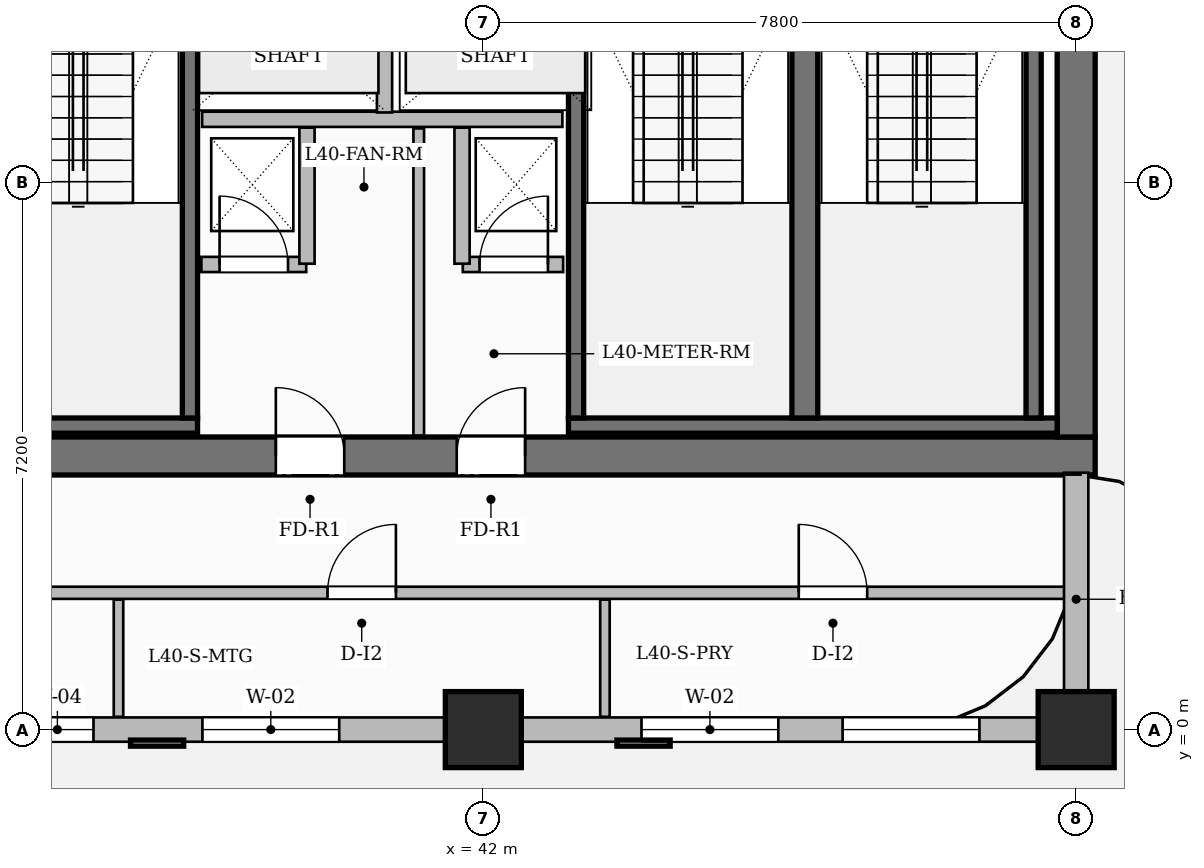
"""IFC4 building model, lengths in metres.
Left out: names, types, materials, properties, quantities, classifications, styles, units other than length and angle.
Written with IfcOpenShell. Run it as: python <this file> out.ifc"""

import sys

from ifc_helpers import new_model, si_unit, direction, frame, frame_2d, origin, origin_2d, place, context, subcontext, project, spatial, rectangle, extrude, source, transform, mapped, element, fill, save


model = new_model("IFC4")
c1 = context("Model", 3, precision=1e-05, world=origin(), true_north=direction((0.0, 1.0)))
c2 = subcontext(c1, "Body", "Model", "MODEL_VIEW")
j1 = project(units=[si_unit("LENGTHUNIT", "METRE"), si_unit("PLANEANGLEUNIT", "RADIAN")], contexts=[c1])
p1 = place(None, origin())
s1 = spatial("IfcSite", under=j1, at=p1, CompositionType="ELEMENT")
p2 = place(p1, origin())
s2 = spatial("IfcBuilding", under=s1, at=p2, CompositionType="ELEMENT")
p3 = place(p2, frame((0.0, 0.0, 161.85)))
s3 = spatial("IfcBuildingStorey", under=s2, at=p3, CompositionType="ELEMENT", Elevation=161.85)
p4 = place(p3, frame((34.55, 3.6, 0.0), z_axis=(0.0, 0.0, 1.0), x_axis=(1.0, 0.0, 0.0)))
e1 = element("IfcWall", 1, at=p4, inside=s3, PredefinedType="SHEAR", context=c2, shape_type="SweptSolid", body=[
    extrude(rectangle(XDim=15.5, YDim=0.5, at=frame_2d((7.75, 0.0))), origin(), (0.0, 0.0, 1.0), 3.85),
])
p5 = place(p4, frame((4.72, 0.0, 0.0)))
e2 = element("IfcOpeningElement", 2, at=p5, cuts=e1, PredefinedType="OPENING", context=c2, shape_type="SweptSolid", body=[
    extrude(rectangle(XDim=0.9, YDim=2.1, at=frame_2d((0.45, 1.05))), frame((0.0, 0.26, 0.0), z_axis=(0.0, -1.0, 0.0), x_axis=(1.0, 0.0, 0.0)), (0.0, 0.0, 1.0), 0.52),
])
p6 = place(p4, frame((7.1, 0.0, 0.0)))
e3 = element("IfcOpeningElement", 3, at=p6, cuts=e1, PredefinedType="OPENING", context=c2, shape_type="SweptSolid", body=[
    extrude(rectangle(XDim=0.9, YDim=2.1, at=frame_2d((0.45, 1.05))), frame((0.0, 0.26, 0.0), z_axis=(0.0, -1.0, 0.0), x_axis=(1.0, 0.0, 0.0)), (0.0, 0.0, 1.0), 0.52),
])
p7 = place(p3, frame((49.8, 3.85, 0.0), z_axis=(0.0, 0.0, 1.0), x_axis=(0.0, 1.0, 0.0)))
e4 = element("IfcWall", 4, at=p7, inside=s3, PredefinedType="SHEAR", context=c2, shape_type="SweptSolid", body=[
    extrude(rectangle(XDim=10.3, YDim=0.5, at=frame_2d((5.15, 0.0))), origin(), (0.0, 0.0, 1.0), 3.85),
])
m1 = source(origin(), c2, "Body", "SweptSolid", [
    extrude(rectangle(XDim=1.0, YDim=1.0, at=origin_2d()), origin(), (0.0, 0.0, 1.0), 3.85),
])
for number, where, z_axis, x_axis in (
    (5, (42.0, 0.0, 0.0), (0.0, 0.0, 1.0), (1.0, 0.0, 0.0)),
    (6, (49.8, 0.0, 0.0), (0.0, 0.0, 1.0), (1.0, 0.0, 0.0)),
):
    element("IfcColumn", number, at=place(p3, frame(where, z_axis=z_axis, x_axis=x_axis)), inside=s3, PredefinedType="COLUMN", context=c2, shape_type="MappedRepresentation", body=[
        mapped(m1, transform((0.0, 0.0, 0.0), scale=1.0)),
    ])
p8 = place(p3, frame((35.05, 4.0, 0.0), z_axis=(0.0, 0.0, 1.0), x_axis=(1.0, 0.0, 0.0)))
e7 = element("IfcWall", 7, at=p8, inside=s3, PredefinedType="SHEAR", context=c2, shape_type="SweptSolid", body=[
    extrude(rectangle(XDim=3.19, YDim=0.2, at=frame_2d((1.595, 0.0))), origin(), (0.0, 0.0, 1.0), 3.85),
])
p9 = place(p3, frame((38.14, 4.1, 0.0), z_axis=(0.0, 0.0, 1.0), x_axis=(0.0, 1.0, 0.0)))
e8 = element("IfcWall", 8, at=p9, inside=s3, PredefinedType="SHEAR", context=c2, shape_type="SweptSolid", body=[
    extrude(rectangle(XDim=6.95, YDim=0.2, at=frame_2d((3.475, 0.0))), origin(), (0.0, 0.0, 1.0), 3.85),
])
p10 = place(p3, frame((43.12, 4.0, 0.0), z_axis=(0.0, 0.0, 1.0), x_axis=(1.0, 0.0, 0.0)))
e9 = element("IfcWall", 9, at=p10, inside=s3, PredefinedType="SHEAR", context=c2, shape_type="SweptSolid", body=[
    extrude(rectangle(XDim=6.43, YDim=0.2, at=frame_2d((3.215, 0.0))), origin(), (0.0, 0.0, 1.0), 3.85),
])
p11 = place(p3, frame((43.22, 4.1, 0.0), z_axis=(0.0, 0.0, 1.0), x_axis=(0.0, 1.0, 0.0)))
e10 = element("IfcWall", 10, at=p11, inside=s3, PredefinedType="SHEAR", context=c2, shape_type="SweptSolid", body=[
    extrude(rectangle(XDim=6.95, YDim=0.2, at=frame_2d((3.475, 0.0))), origin(), (0.0, 0.0, 1.0), 3.85),
])
p12 = place(p3, frame((46.23, 4.1, 0.0), z_axis=(0.0, 0.0, 1.0), x_axis=(0.0, 1.0, 0.0)))
e11 = element("IfcWall", 11, at=p12, inside=s3, PredefinedType="SHEAR", context=c2, shape_type="SweptSolid", body=[
    extrude(rectangle(XDim=6.95, YDim=0.34, at=frame_2d((3.475, 0.0))), origin(), (0.0, 0.0, 1.0), 3.85),
])
p13 = place(p3, frame((49.24, 4.1, 0.0), z_axis=(0.0, 0.0, 1.0), x_axis=(0.0, 1.0, 0.0)))
e12 = element("IfcWall", 12, at=p13, inside=s3, PredefinedType="SHEAR", context=c2, shape_type="SweptSolid", body=[
    extrude(rectangle(XDim=6.95, YDim=0.2, at=frame_2d((3.475, 0.0))), origin(), (0.0, 0.0, 1.0), 3.85),
])
p14 = place(p3, frame((38.3, 8.03, 0.0), z_axis=(0.0, 0.0, 1.0), x_axis=(1.0, 0.0, 0.0)))
e13 = element("IfcWall", 13, at=p14, inside=s3, PredefinedType="PARTITIONING", context=c2, shape_type="SweptSolid", body=[
    extrude(rectangle(XDim=4.74, YDim=0.2, at=frame_2d((2.37, 0.0))), origin(), (0.0, 0.0, 1.0), 3.6),
])
p15 = place(p3, frame((40.7, 8.12, 0.0), z_axis=(0.0, 0.0, 1.0), x_axis=(0.0, 1.0, 0.0)))
e14 = element("IfcWall", 14, at=p15, inside=s3, PredefinedType="PARTITIONING", context=c2, shape_type="SweptSolid", body=[
    extrude(rectangle(XDim=2.18, YDim=0.2, at=frame_2d((1.09, 0.0))), origin(), (0.0, 0.0, 1.0), 3.6),
])
p16 = place(p3, frame((38.29, 6.12, 0.0), z_axis=(0.0, 0.0, 1.0), x_axis=(1.0, 0.0, 0.0)))
e15 = element("IfcWall", 15, at=p16, inside=s3, PredefinedType="PARTITIONING", context=c2, shape_type="SweptSolid", body=[
    extrude(rectangle(XDim=1.38, YDim=0.2, at=frame_2d((0.69, 0.0))), origin(), (0.0, 0.0, 1.0), 3.6),
])
p17 = place(p16, frame((0.24, 0.0, 0.0)))
e16 = element("IfcOpeningElement", 16, at=p17, cuts=e15, PredefinedType="OPENING", context=c2, shape_type="SweptSolid", body=[
    extrude(rectangle(XDim=0.9, YDim=2.1, at=frame_2d((0.45, 1.05))), frame((0.0, 0.11, 0.0), z_axis=(0.0, -1.0, 0.0), x_axis=(1.0, 0.0, 0.0)), (0.0, 0.0, 1.0), 0.22),
])
p18 = place(p3, frame((39.68, 6.13, 0.0), z_axis=(0.0, 0.0, 1.0), x_axis=(0.0, 1.0, 0.0)))
e17 = element("IfcWall", 17, at=p18, inside=s3, PredefinedType="PARTITIONING", context=c2, shape_type="SweptSolid", body=[
    extrude(rectangle(XDim=1.79, YDim=0.2, at=frame_2d((0.895, 0.0))), origin(), (0.0, 0.0, 1.0), 3.6),
])
p19 = place(p3, frame((41.73, 6.12, 0.0), z_axis=(0.0, 0.0, 1.0), x_axis=(1.0, 0.0, 0.0)))
e18 = element("IfcWall", 18, at=p19, inside=s3, PredefinedType="PARTITIONING", context=c2, shape_type="SweptSolid", body=[
    extrude(rectangle(XDim=1.32, YDim=0.2, at=frame_2d((0.66, 0.0))), origin(), (0.0, 0.0, 1.0), 3.6),
])
p20 = place(p19, frame((0.22, 0.0, 0.0)))
e19 = element("IfcOpeningElement", 19, at=p20, cuts=e18, PredefinedType="OPENING", context=c2, shape_type="SweptSolid", body=[
    extrude(rectangle(XDim=0.9, YDim=2.1, at=frame_2d((0.45, 1.05))), frame((0.0, 0.11, 0.0), z_axis=(0.0, -1.0, 0.0), x_axis=(1.0, 0.0, 0.0)), (0.0, 0.0, 1.0), 0.22),
])
p21 = place(p3, frame((41.72, 6.13, 0.0), z_axis=(0.0, 0.0, 1.0), x_axis=(0.0, 1.0, 0.0)))
e20 = element("IfcWall", 20, at=p21, inside=s3, PredefinedType="PARTITIONING", context=c2, shape_type="SweptSolid", body=[
    extrude(rectangle(XDim=1.79, YDim=0.2, at=frame_2d((0.895, 0.0))), origin(), (0.0, 0.0, 1.0), 3.6),
])
p22 = place(p3, frame((41.15, 3.87, 0.0), z_axis=(0.0, 0.0, 1.0), x_axis=(0.0, 1.0, 0.0)))
e21 = element("IfcWall", 21, at=p22, inside=s3, PredefinedType="PARTITIONING", context=c2, shape_type="SweptSolid", body=[
    extrude(rectangle(XDim=4.04, YDim=0.14, at=frame_2d((2.02, 0.0))), origin(), (0.0, 0.0, 1.0), 3.6),
])
p23 = place(p3, frame((30.29, 1.8, 0.0), z_axis=(0.0, 0.0, 1.0), x_axis=(1.0, 0.0, 0.0)))
e22 = element("IfcWall", 22, at=p23, inside=s3, PredefinedType="PARTITIONING", context=c2, shape_type="SweptSolid", body=[
    extrude(rectangle(XDim=19.37, YDim=0.16, at=frame_2d((9.685, 0.0))), origin(), (0.0, 0.0, 1.0), 3.6),
])
p24 = place(p23, frame((2.916, 0.0, 0.0)))
e23 = element("IfcOpeningElement", 23, at=p24, cuts=e22, PredefinedType="OPENING", context=c2, shape_type="SweptSolid", body=[
    extrude(rectangle(XDim=0.9, YDim=2.15, at=frame_2d((0.45, 1.075))), frame((0.0, 0.09, 0.0), z_axis=(0.0, -1.0, 0.0), x_axis=(1.0, 0.0, 0.0)), (0.0, 0.0, 1.0), 0.18),
])
p25 = place(p23, frame((9.66, 0.0, 0.0)))
e24 = element("IfcOpeningElement", 24, at=p25, cuts=e22, PredefinedType="OPENING", context=c2, shape_type="SweptSolid", body=[
    extrude(rectangle(XDim=0.9, YDim=2.15, at=frame_2d((0.45, 1.075))), frame((0.0, 0.09, 0.0), z_axis=(0.0, -1.0, 0.0), x_axis=(1.0, 0.0, 0.0)), (0.0, 0.0, 1.0), 0.18),
])
p26 = place(p23, frame((15.86, 0.0, 0.0)))
e25 = element("IfcOpeningElement", 25, at=p26, cuts=e22, PredefinedType="OPENING", context=c2, shape_type="SweptSolid", body=[
    extrude(rectangle(XDim=0.9, YDim=2.15, at=frame_2d((0.45, 1.075))), frame((0.0, 0.09, 0.0), z_axis=(0.0, -1.0, 0.0), x_axis=(1.0, 0.0, 0.0)), (0.0, 0.0, 1.0), 0.18),
])
for number, where, z_axis, x_axis in (
    (26, (37.2, 0.168, 0.0), (0.0, 0.0, 1.0), (0.0, 1.0, 0.0)),
    (27, (43.6, 0.168, 0.0), (0.0, 0.0, 1.0), (0.0, 1.0, 0.0)),
):
    element("IfcWall", number, at=place(p3, frame(where, z_axis=z_axis, x_axis=x_axis)), inside=s3, PredefinedType="PARTITIONING", context=c2, shape_type="SweptSolid", body=[
        extrude(rectangle(XDim=1.542, YDim=0.125, at=frame_2d((0.771, 0.0))), origin(), (0.0, 0.0, 1.0), 3.6),
    ])
p27 = place(p3, frame((14.4, 0.0, 0.0), z_axis=(0.0, 0.0, 1.0), x_axis=(1.0, 0.0, 0.0)))
e28 = element("IfcWall", 28, at=p27, inside=s3, PredefinedType="SOLIDWALL", context=c2, shape_type="SweptSolid", body=[
    extrude(rectangle(XDim=35.4, YDim=0.32, at=frame_2d((17.7, 0.0))), origin(), (0.0, 0.0, 1.0), 3.085),
])
p28 = place(p27, frame((0.85, 0.0, 0.0)))
e29 = element("IfcOpeningElement", 29, at=p28, cuts=e28, PredefinedType="OPENING", context=c2, shape_type="SweptSolid", body=[
    extrude(rectangle(XDim=1.2, YDim=2.2, at=frame_2d((0.6, 1.1))), frame((0.0, 0.17, 0.0), z_axis=(0.0, -1.0, 0.0), x_axis=(1.0, 0.0, 0.0)), (0.0, 0.0, 1.0), 0.34),
])
p29 = place(p27, frame((2.696, 0.0, 0.8)))
e30 = element("IfcOpeningElement", 30, at=p29, cuts=e28, PredefinedType="OPENING", context=c2, shape_type="SweptSolid", body=[
    extrude(rectangle(XDim=1.15, YDim=1.8, at=frame_2d((0.575, 0.9))), frame((0.0, 0.17, 0.0), z_axis=(0.0, -1.0, 0.0), x_axis=(1.0, 0.0, 0.0)), (0.0, 0.0, 1.0), 0.34),
])
p30 = place(p27, frame((4.604, 0.0, 0.8)))
e31 = element("IfcOpeningElement", 31, at=p30, cuts=e28, PredefinedType="OPENING", context=c2, shape_type="SweptSolid", body=[
    extrude(rectangle(XDim=1.4, YDim=1.85, at=frame_2d((0.7, 0.925))), frame((0.0, 0.17, 0.0), z_axis=(0.0, -1.0, 0.0), x_axis=(1.0, 0.0, 0.0)), (0.0, 0.0, 1.0), 0.34),
])
p31 = place(p27, frame((8.181, 0.0, 0.8)))
e32 = element("IfcOpeningElement", 32, at=p31, cuts=e28, PredefinedType="OPENING", context=c2, shape_type="SweptSolid", body=[
    extrude(rectangle(XDim=0.95, YDim=1.75, at=frame_2d((0.475, 0.875))), frame((0.0, 0.17, 0.0), z_axis=(0.0, -1.0, 0.0), x_axis=(1.0, 0.0, 0.0)), (0.0, 0.0, 1.0), 0.34),
])
p32 = place(p27, frame((9.9, 0.0, 0.8)))
e33 = element("IfcOpeningElement", 33, at=p32, cuts=e28, PredefinedType="OPENING", context=c2, shape_type="SweptSolid", body=[
    extrude(rectangle(XDim=1.8, YDim=1.85, at=frame_2d((0.9, 0.925))), frame((0.0, 0.17, 0.0), z_axis=(0.0, -1.0, 0.0), x_axis=(1.0, 0.0, 0.0)), (0.0, 0.0, 1.0), 0.34),
])
p33 = place(p27, frame((12.469, 0.0, 0.8)))
e34 = element("IfcOpeningElement", 34, at=p33, cuts=e28, PredefinedType="OPENING", context=c2, shape_type="SweptSolid", body=[
    extrude(rectangle(XDim=0.95, YDim=1.75, at=frame_2d((0.475, 0.875))), frame((0.0, 0.17, 0.0), z_axis=(0.0, -1.0, 0.0), x_axis=(1.0, 0.0, 0.0)), (0.0, 0.0, 1.0), 0.34),
])
p34 = place(p27, frame((16.804, 0.0, 0.8)))
e35 = element("IfcOpeningElement", 35, at=p34, cuts=e28, PredefinedType="OPENING", context=c2, shape_type="SweptSolid", body=[
    extrude(rectangle(XDim=1.8, YDim=1.85, at=frame_2d((0.9, 0.925))), frame((0.0, 0.17, 0.0), z_axis=(0.0, -1.0, 0.0), x_axis=(1.0, 0.0, 0.0)), (0.0, 0.0, 1.0), 0.34),
])
p35 = place(p27, frame((21.521, 0.0, 0.8)))
e36 = element("IfcOpeningElement", 36, at=p35, cuts=e28, PredefinedType="OPENING", context=c2, shape_type="SweptSolid", body=[
    extrude(rectangle(XDim=0.95, YDim=1.75, at=frame_2d((0.475, 0.875))), frame((0.0, 0.17, 0.0), z_axis=(0.0, -1.0, 0.0), x_axis=(1.0, 0.0, 0.0)), (0.0, 0.0, 1.0), 0.34),
])
p36 = place(p27, frame((23.904, 0.0, 0.8)))
e37 = element("IfcOpeningElement", 37, at=p36, cuts=e28, PredefinedType="OPENING", context=c2, shape_type="SweptSolid", body=[
    extrude(rectangle(XDim=1.8, YDim=1.85, at=frame_2d((0.9, 0.925))), frame((0.0, 0.17, 0.0), z_axis=(0.0, -1.0, 0.0), x_axis=(1.0, 0.0, 0.0)), (0.0, 0.0, 1.0), 0.34),
])
p37 = place(p27, frame((29.681, 0.0, 0.8)))
e38 = element("IfcOpeningElement", 38, at=p37, cuts=e28, PredefinedType="OPENING", context=c2, shape_type="SweptSolid", body=[
    extrude(rectangle(XDim=1.8, YDim=1.85, at=frame_2d((0.9, 0.925))), frame((0.0, 0.17, 0.0), z_axis=(0.0, -1.0, 0.0), x_axis=(1.0, 0.0, 0.0)), (0.0, 0.0, 1.0), 0.34),
])
p38 = place(p27, frame((32.327, 0.0, 0.8)))
e39 = element("IfcOpeningElement", 39, at=p38, cuts=e28, PredefinedType="OPENING", context=c2, shape_type="SweptSolid", body=[
    extrude(rectangle(XDim=1.8, YDim=1.85, at=frame_2d((0.9, 0.925))), frame((0.0, 0.17, 0.0), z_axis=(0.0, -1.0, 0.0), x_axis=(1.0, 0.0, 0.0)), (0.0, 0.0, 1.0), 0.34),
])
p39 = place(p3, frame((49.8, 0.05, 0.0), z_axis=(0.0, 0.0, 1.0), x_axis=(0.0, 1.0, 0.0)))
e40 = element("IfcWall", 40, at=p39, inside=s3, PredefinedType="SOLIDWALL", context=c2, shape_type="SweptSolid", body=[
    extrude(rectangle(XDim=3.33, YDim=0.32, at=frame_2d((1.665, 0.0))), origin(), (0.0, 0.0, 1.0), 3.6),
])
m2 = source(origin(), c2, "Body", "SweptSolid", [
    extrude(rectangle(XDim=0.9, YDim=2.1, at=frame_2d((0.45, 1.05))), frame((0.0, 0.025, 0.0), z_axis=(0.0, -1.0, 0.0), x_axis=(1.0, 0.0, 0.0)), (0.0, 0.0, 1.0), 0.05),
])
p40 = place(p17, origin())
e41 = element("IfcDoor", 41, at=p40, inside=s3, OperationType="SINGLE_SWING_LEFT", PredefinedType="DOOR", context=c2, shape_type="MappedRepresentation", body=[
    mapped(m2, transform((0.0, 0.0, 0.0), scale=1.0)),
])
fill(e16, e41)
p41 = place(p20, origin())
e42 = element("IfcDoor", 42, at=p41, inside=s3, OperationType="SINGLE_SWING_RIGHT", PredefinedType="DOOR", context=c2, shape_type="MappedRepresentation", body=[
    mapped(m2, transform((0.0, 0.0, 0.0), scale=1.0)),
])
fill(e19, e42)
p42 = place(p5, origin())
e43 = element("IfcDoor", 43, at=p42, inside=s3, OperationType="SINGLE_SWING_LEFT", PredefinedType="DOOR", context=c2, shape_type="MappedRepresentation", body=[
    mapped(m2, transform((0.0, 0.0, 0.0), scale=1.0)),
])
fill(e2, e43)
p43 = place(p6, origin())
e44 = element("IfcDoor", 44, at=p43, inside=s3, OperationType="SINGLE_SWING_RIGHT", PredefinedType="DOOR", context=c2, shape_type="MappedRepresentation", body=[
    mapped(m2, transform((0.0, 0.0, 0.0), scale=1.0)),
])
fill(e3, e44)
m3 = source(origin(), c2, "Body", "SweptSolid", [
    extrude(rectangle(XDim=0.9, YDim=2.15, at=frame_2d((0.45, 1.075))), frame((0.0, 0.025, 0.0), z_axis=(0.0, -1.0, 0.0), x_axis=(1.0, 0.0, 0.0)), (0.0, 0.0, 1.0), 0.05),
])
p44 = place(p25, origin())
e45 = element("IfcDoor", 45, at=p44, inside=s3, OperationType="SINGLE_SWING_RIGHT", PredefinedType="DOOR", context=c2, shape_type="MappedRepresentation", body=[
    mapped(m3, transform((0.0, 0.0, 0.0), scale=1.0)),
])
fill(e24, e45)
p45 = place(p26, origin())
e46 = element("IfcDoor", 46, at=p45, inside=s3, OperationType="SINGLE_SWING_LEFT", PredefinedType="DOOR", context=c2, shape_type="MappedRepresentation", body=[
    mapped(m3, transform((0.0, 0.0, 0.0), scale=1.0)),
])
fill(e25, e46)
m4 = source(origin(), c2, "Body", "SweptSolid", [
    extrude(rectangle(XDim=0.95, YDim=1.75, at=frame_2d((0.475, 0.875))), frame((0.0, 0.03, 0.0), z_axis=(0.0, -1.0, 0.0), x_axis=(1.0, 0.0, 0.0)), (0.0, 0.0, 1.0), 0.06),
])
p46 = place(p35, origin())
e47 = element("IfcWindow", 47, at=p46, inside=s3, PartitioningType="SINGLE_PANEL", PredefinedType="WINDOW", context=c2, shape_type="MappedRepresentation", body=[
    mapped(m4, transform((0.0, 0.0, 0.0), scale=1.0)),
])
fill(e36, e47)
m5 = source(origin(), c2, "Body", "SweptSolid", [
    extrude(rectangle(XDim=1.8, YDim=1.85, at=frame_2d((0.9, 0.925))), frame((0.0, 0.03, 0.0), z_axis=(0.0, -1.0, 0.0), x_axis=(1.0, 0.0, 0.0)), (0.0, 0.0, 1.0), 0.06),
])
p47 = place(p36, origin())
e48 = element("IfcWindow", 48, at=p47, inside=s3, PartitioningType="DOUBLE_PANEL_VERTICAL", PredefinedType="WINDOW", context=c2, shape_type="MappedRepresentation", body=[
    mapped(m5, transform((0.0, 0.0, 0.0), scale=1.0)),
])
fill(e37, e48)
p48 = place(p37, origin())
e49 = element("IfcWindow", 49, at=p48, inside=s3, PartitioningType="DOUBLE_PANEL_VERTICAL", PredefinedType="WINDOW", context=c2, shape_type="MappedRepresentation", body=[
    mapped(m5, transform((0.0, 0.0, 0.0), scale=1.0)),
])
fill(e38, e49)
p49 = place(p38, origin())
e50 = element("IfcWindow", 50, at=p49, inside=s3, PartitioningType="DOUBLE_PANEL_VERTICAL", PredefinedType="WINDOW", context=c2, shape_type="MappedRepresentation", body=[
    mapped(m5, transform((0.0, 0.0, 0.0), scale=1.0)),
])
fill(e39, e50)
save(model, sys.argv[1])
